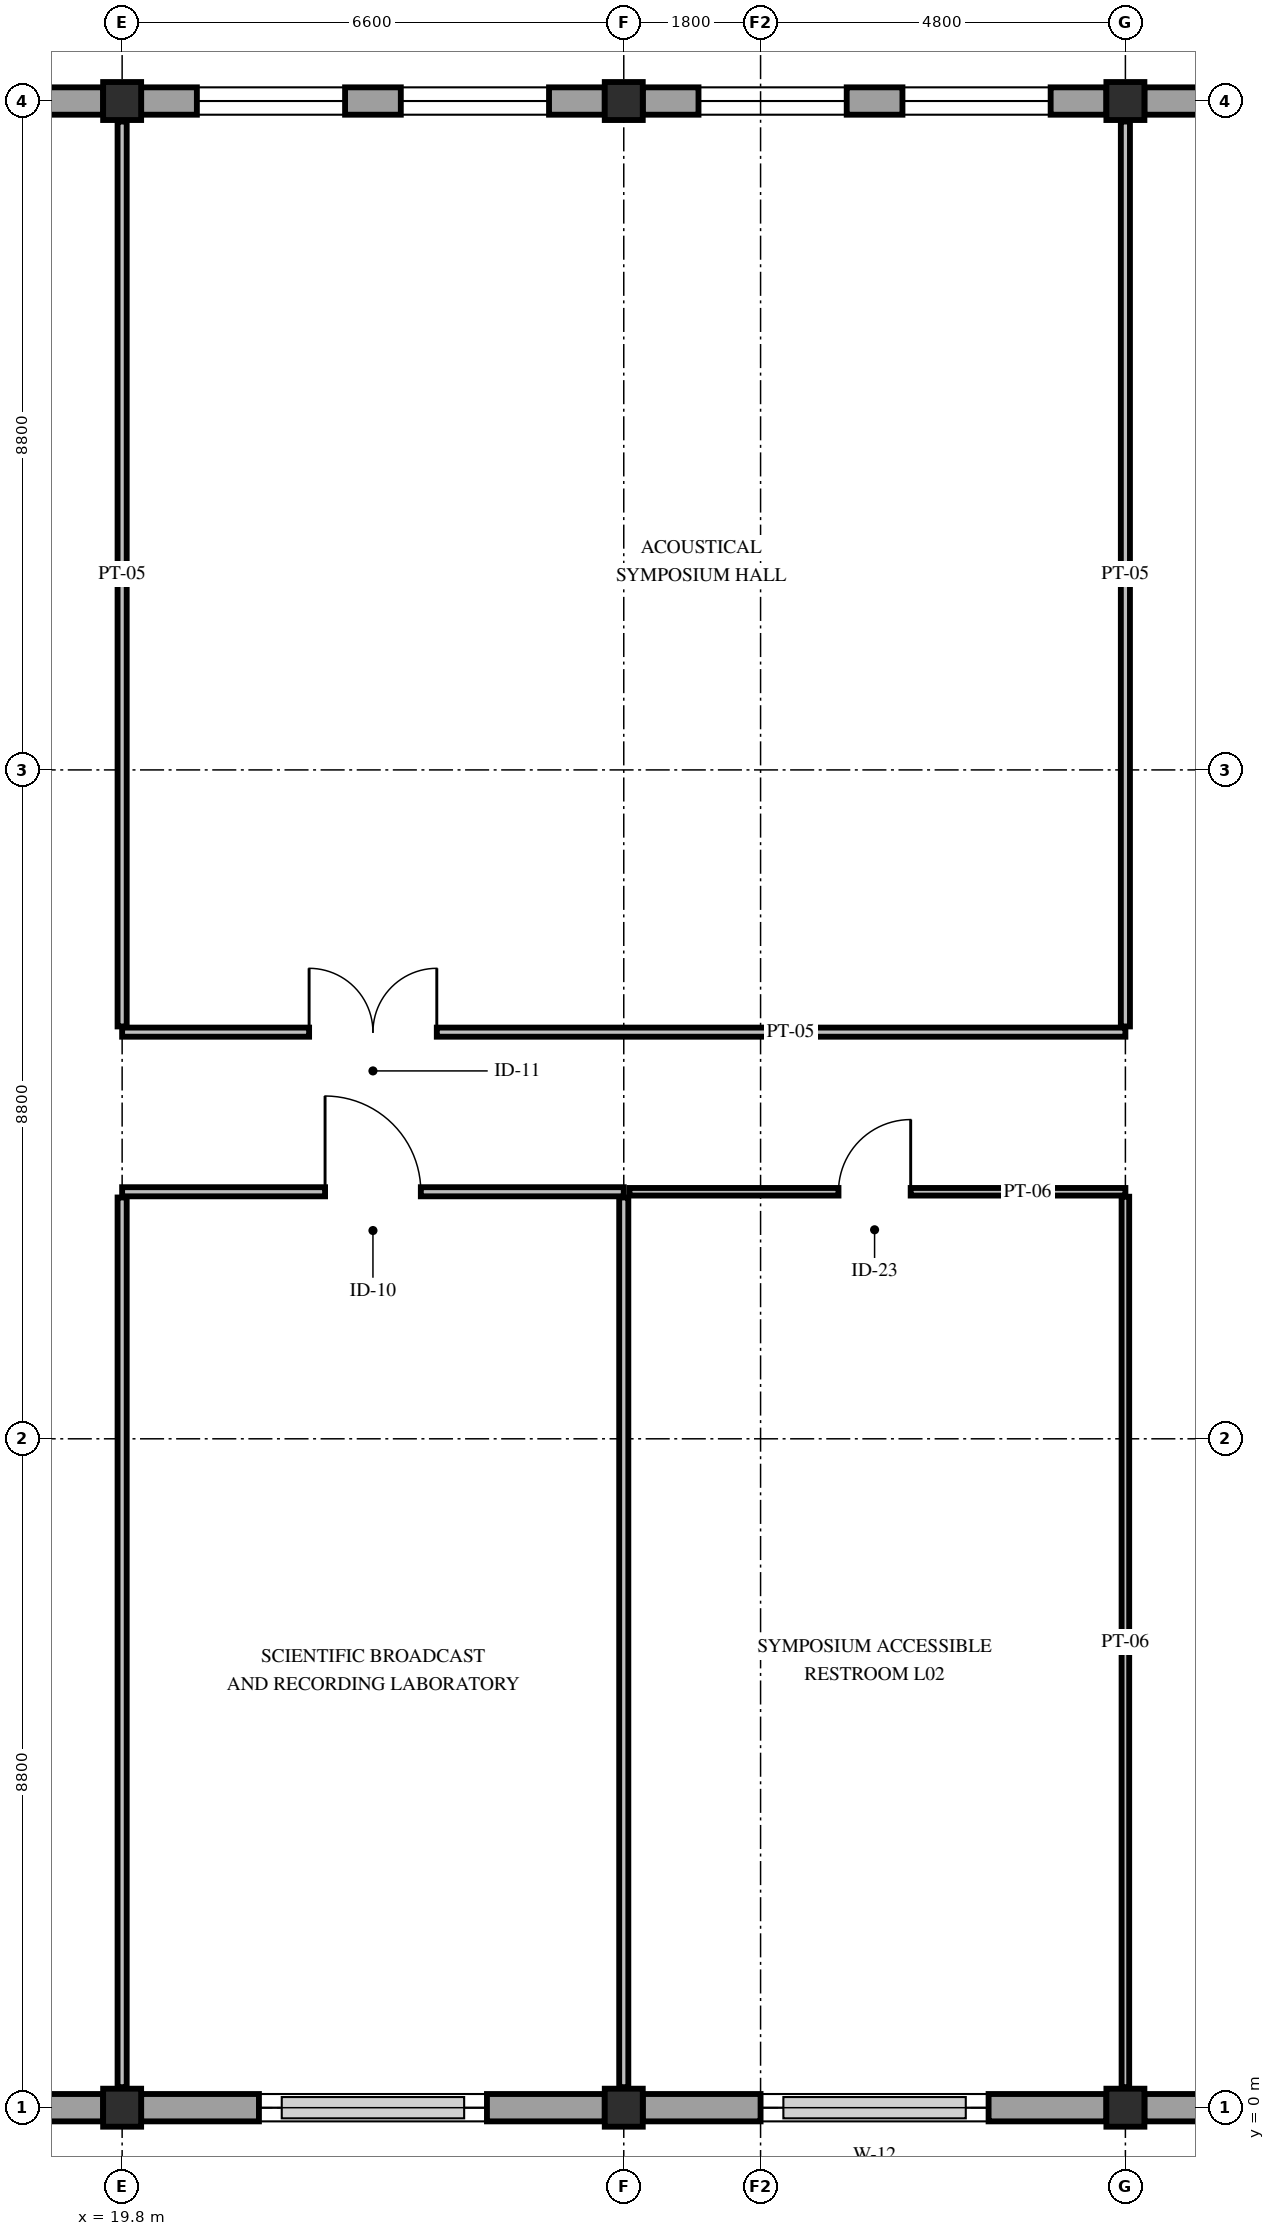
"""IFC4 building model, lengths in metres.
Left out: names, types, materials, properties, quantities, classifications, styles, units other than length and angle.
Written with IfcOpenShell. Run it as: python <this file> out.ifc"""

import sys

from ifc_helpers import new_model, si_unit, direction, frame, frame_2d, origin, origin_2d, place, context, subcontext, project, spatial, rectangle, extrude, element, fill, save


model = new_model("IFC4")
c1 = context("Model", 3, precision=1e-05, world=origin(), true_north=direction((0.0, 1.0)))
c2 = subcontext(c1, "Body", "Model", "MODEL_VIEW")
j1 = project(units=[si_unit("LENGTHUNIT", "METRE"), si_unit("PLANEANGLEUNIT", "RADIAN")], contexts=[c1])
p1 = place(None, origin())
s1 = spatial("IfcSite", under=j1, at=p1, CompositionType="ELEMENT")
p2 = place(p1, origin())
s2 = spatial("IfcBuilding", under=s1, at=p2, CompositionType="ELEMENT")
p3 = place(p2, frame((0.0, 0.0, 10.2)))
s3 = spatial("IfcBuildingStorey", under=s2, at=p3, CompositionType="ELEMENT", Elevation=10.2)
for number, where, z_axis, x_axis in (
    (1, (19.8, 0.0, 0.0), (0.0, 0.0, 1.0), (1.0, 0.0, 0.0)),
    (2, (19.8, 26.4, 0.0), (0.0, 0.0, 1.0), (1.0, 0.0, 0.0)),
    (3, (26.4, 0.0, 0.0), (0.0, 0.0, 1.0), (1.0, 0.0, 0.0)),
    (4, (26.4, 26.4, 0.0), (0.0, 0.0, 1.0), (1.0, 0.0, 0.0)),
    (5, (33.0, 0.0, 0.0), (0.0, 0.0, 1.0), (1.0, 0.0, 0.0)),
    (6, (33.0, 26.4, 0.0), (0.0, 0.0, 1.0), (1.0, 0.0, 0.0)),
):
    element("IfcColumn", number, at=place(p3, frame(where, z_axis=z_axis, x_axis=x_axis)), inside=s3, PredefinedType="COLUMN", context=c2, shape_type="SweptSolid", body=[
        extrude(rectangle(XDim=0.5, YDim=0.5, at=origin_2d()), origin(), (0.0, 0.0, 1.0), 4.8),
    ])
p4 = place(p3, frame((13.45, 26.4, 0.0), z_axis=(0.0, 0.0, 1.0), x_axis=(1.0, 0.0, 0.0)))
e7 = element("IfcWall", 7, at=p4, inside=s3, PredefinedType="STANDARD", context=c2, shape_type="SweptSolid", body=[
    extrude(rectangle(XDim=6.1, YDim=0.36, at=frame_2d((3.05, 0.0))), origin(), (0.0, 0.0, 1.0), 3.36),
])
p5 = place(p4, frame((0.733, 0.0, 0.85)))
e8 = element("IfcOpeningElement", 8, at=p5, cuts=e7, PredefinedType="OPENING", context=c2, shape_type="SweptSolid", body=[
    extrude(rectangle(XDim=1.95, YDim=1.5, at=frame_2d((0.975, 0.75))), frame((0.0, 0.195, 0.0), z_axis=(0.0, -1.0, 0.0), x_axis=(1.0, 0.0, 0.0)), (0.0, 0.0, 1.0), 0.39),
])
p6 = place(p4, frame((3.417, 0.0, 0.85)))
e9 = element("IfcOpeningElement", 9, at=p6, cuts=e7, PredefinedType="OPENING", context=c2, shape_type="SweptSolid", body=[
    extrude(rectangle(XDim=1.95, YDim=1.5, at=frame_2d((0.975, 0.75))), frame((0.0, 0.195, 0.0), z_axis=(0.0, -1.0, 0.0), x_axis=(1.0, 0.0, 0.0)), (0.0, 0.0, 1.0), 0.39),
])
p7 = place(p3, frame((20.05, 26.4, 0.0), z_axis=(0.0, 0.0, 1.0), x_axis=(1.0, 0.0, 0.0)))
e10 = element("IfcWall", 10, at=p7, inside=s3, PredefinedType="STANDARD", context=c2, shape_type="SweptSolid", body=[
    extrude(rectangle(XDim=6.1, YDim=0.36, at=frame_2d((3.05, 0.0))), origin(), (0.0, 0.0, 1.0), 3.36),
])
p8 = place(p7, frame((0.733, 0.0, 0.85)))
e11 = element("IfcOpeningElement", 11, at=p8, cuts=e10, PredefinedType="OPENING", context=c2, shape_type="SweptSolid", body=[
    extrude(rectangle(XDim=1.95, YDim=1.5, at=frame_2d((0.975, 0.75))), frame((0.0, 0.195, 0.0), z_axis=(0.0, -1.0, 0.0), x_axis=(1.0, 0.0, 0.0)), (0.0, 0.0, 1.0), 0.39),
])
p9 = place(p7, frame((3.417, 0.0, 0.85)))
e12 = element("IfcOpeningElement", 12, at=p9, cuts=e10, PredefinedType="OPENING", context=c2, shape_type="SweptSolid", body=[
    extrude(rectangle(XDim=1.95, YDim=1.5, at=frame_2d((0.975, 0.75))), frame((0.0, 0.195, 0.0), z_axis=(0.0, -1.0, 0.0), x_axis=(1.0, 0.0, 0.0)), (0.0, 0.0, 1.0), 0.39),
])
p10 = place(p3, frame((26.65, 26.4, 0.0), z_axis=(0.0, 0.0, 1.0), x_axis=(1.0, 0.0, 0.0)))
e13 = element("IfcWall", 13, at=p10, inside=s3, PredefinedType="STANDARD", context=c2, shape_type="SweptSolid", body=[
    extrude(rectangle(XDim=6.1, YDim=0.36, at=frame_2d((3.05, 0.0))), origin(), (0.0, 0.0, 1.0), 3.36),
])
p11 = place(p10, frame((0.733, 0.0, 0.85)))
e14 = element("IfcOpeningElement", 14, at=p11, cuts=e13, PredefinedType="OPENING", context=c2, shape_type="SweptSolid", body=[
    extrude(rectangle(XDim=1.95, YDim=1.5, at=frame_2d((0.975, 0.75))), frame((0.0, 0.195, 0.0), z_axis=(0.0, -1.0, 0.0), x_axis=(1.0, 0.0, 0.0)), (0.0, 0.0, 1.0), 0.39),
])
p12 = place(p10, frame((3.417, 0.0, 0.85)))
e15 = element("IfcOpeningElement", 15, at=p12, cuts=e13, PredefinedType="OPENING", context=c2, shape_type="SweptSolid", body=[
    extrude(rectangle(XDim=1.95, YDim=1.5, at=frame_2d((0.975, 0.75))), frame((0.0, 0.195, 0.0), z_axis=(0.0, -1.0, 0.0), x_axis=(1.0, 0.0, 0.0)), (0.0, 0.0, 1.0), 0.39),
])
p13 = place(p3, frame((33.25, 26.4, 0.0), z_axis=(0.0, 0.0, 1.0), x_axis=(1.0, 0.0, 0.0)))
e16 = element("IfcWall", 16, at=p13, inside=s3, PredefinedType="STANDARD", context=c2, shape_type="SweptSolid", body=[
    extrude(rectangle(XDim=6.1, YDim=0.36, at=frame_2d((3.05, 0.0))), origin(), (0.0, 0.0, 1.0), 3.36),
])
p14 = place(p13, frame((0.733, 0.0, 0.85)))
e17 = element("IfcOpeningElement", 17, at=p14, cuts=e16, PredefinedType="OPENING", context=c2, shape_type="SweptSolid", body=[
    extrude(rectangle(XDim=1.95, YDim=1.5, at=frame_2d((0.975, 0.75))), frame((0.0, 0.195, 0.0), z_axis=(0.0, -1.0, 0.0), x_axis=(1.0, 0.0, 0.0)), (0.0, 0.0, 1.0), 0.39),
])
p15 = place(p13, frame((3.417, 0.0, 0.85)))
e18 = element("IfcOpeningElement", 18, at=p15, cuts=e16, PredefinedType="OPENING", context=c2, shape_type="SweptSolid", body=[
    extrude(rectangle(XDim=1.95, YDim=1.5, at=frame_2d((0.975, 0.75))), frame((0.0, 0.195, 0.0), z_axis=(0.0, -1.0, 0.0), x_axis=(1.0, 0.0, 0.0)), (0.0, 0.0, 1.0), 0.39),
])
p16 = place(p3, frame((39.35, 0.0, 0.0), z_axis=(0.0, 0.0, 1.0), x_axis=(-1.0, 0.0, 0.0)))
e19 = element("IfcWall", 19, at=p16, inside=s3, PredefinedType="STANDARD", context=c2, shape_type="SweptSolid", body=[
    extrude(rectangle(XDim=6.1, YDim=0.36, at=frame_2d((3.05, 0.0))), origin(), (0.0, 0.0, 1.0), 3.36),
])
p17 = place(p16, frame((1.55, 0.0, 0.85)))
e20 = element("IfcOpeningElement", 20, at=p17, cuts=e19, PredefinedType="OPENING", context=c2, shape_type="SweptSolid", body=[
    extrude(rectangle(XDim=3.0, YDim=1.5, at=frame_2d((1.5, 0.75))), frame((0.0, 0.195, 0.0), z_axis=(0.0, -1.0, 0.0), x_axis=(1.0, 0.0, 0.0)), (0.0, 0.0, 1.0), 0.39),
])
p18 = place(p3, frame((32.75, 0.0, 0.0), z_axis=(0.0, 0.0, 1.0), x_axis=(-1.0, 0.0, 0.0)))
e21 = element("IfcWall", 21, at=p18, inside=s3, PredefinedType="STANDARD", context=c2, shape_type="SweptSolid", body=[
    extrude(rectangle(XDim=6.1, YDim=0.36, at=frame_2d((3.05, 0.0))), origin(), (0.0, 0.0, 1.0), 3.36),
])
p19 = place(p18, frame((1.55, 0.0, 0.85)))
e22 = element("IfcOpeningElement", 22, at=p19, cuts=e21, PredefinedType="OPENING", context=c2, shape_type="SweptSolid", body=[
    extrude(rectangle(XDim=3.0, YDim=1.5, at=frame_2d((1.5, 0.75))), frame((0.0, 0.195, 0.0), z_axis=(0.0, -1.0, 0.0), x_axis=(1.0, 0.0, 0.0)), (0.0, 0.0, 1.0), 0.39),
])
p20 = place(p3, frame((26.15, 0.0, 0.0), z_axis=(0.0, 0.0, 1.0), x_axis=(-1.0, 0.0, 0.0)))
e23 = element("IfcWall", 23, at=p20, inside=s3, PredefinedType="STANDARD", context=c2, shape_type="SweptSolid", body=[
    extrude(rectangle(XDim=6.1, YDim=0.36, at=frame_2d((3.05, 0.0))), origin(), (0.0, 0.0, 1.0), 3.36),
])
p21 = place(p20, frame((1.55, 0.0, 0.85)))
e24 = element("IfcOpeningElement", 24, at=p21, cuts=e23, PredefinedType="OPENING", context=c2, shape_type="SweptSolid", body=[
    extrude(rectangle(XDim=3.0, YDim=1.5, at=frame_2d((1.5, 0.75))), frame((0.0, 0.195, 0.0), z_axis=(0.0, -1.0, 0.0), x_axis=(1.0, 0.0, 0.0)), (0.0, 0.0, 1.0), 0.39),
])
p22 = place(p3, frame((19.55, 0.0, 0.0), z_axis=(0.0, 0.0, 1.0), x_axis=(-1.0, 0.0, 0.0)))
e25 = element("IfcWall", 25, at=p22, inside=s3, PredefinedType="STANDARD", context=c2, shape_type="SweptSolid", body=[
    extrude(rectangle(XDim=6.1, YDim=0.36, at=frame_2d((3.05, 0.0))), origin(), (0.0, 0.0, 1.0), 3.36),
])
p23 = place(p22, frame((1.55, 0.0, 0.85)))
e26 = element("IfcOpeningElement", 26, at=p23, cuts=e25, PredefinedType="OPENING", context=c2, shape_type="SweptSolid", body=[
    extrude(rectangle(XDim=3.0, YDim=1.5, at=frame_2d((1.5, 0.75))), frame((0.0, 0.195, 0.0), z_axis=(0.0, -1.0, 0.0), x_axis=(1.0, 0.0, 0.0)), (0.0, 0.0, 1.0), 0.39),
])
p24 = place(p3, frame((19.8, 14.15, 0.0), z_axis=(0.0, 0.0, 1.0), x_axis=(1.0, 0.0, 0.0)))
e27 = element("IfcWall", 27, at=p24, inside=s3, PredefinedType="PARTITIONING", context=c2, shape_type="SweptSolid", body=[
    extrude(rectangle(XDim=13.2, YDim=0.12, at=frame_2d((6.6, 0.0))), origin(), (0.0, 0.0, 1.0), 3.36),
])
p25 = place(p24, frame((2.46, 0.0, 0.0)))
e28 = element("IfcOpeningElement", 28, at=p25, cuts=e27, PredefinedType="OPENING", context=c2, shape_type="SweptSolid", body=[
    extrude(rectangle(XDim=1.68, YDim=2.3, at=frame_2d((0.84, 1.15))), frame((0.0, 0.075, 0.0), z_axis=(0.0, -1.0, 0.0), x_axis=(1.0, 0.0, 0.0)), (0.0, 0.0, 1.0), 0.15),
])
for number, where, z_axis, x_axis in (
    (29, (19.8, 14.225, 0.0), (0.0, 0.0, 1.0), (0.0, 1.0, 0.0)),
    (30, (33.0, 14.225, 0.0), (0.0, 0.0, 1.0), (0.0, 1.0, 0.0)),
):
    element("IfcWall", number, at=place(p3, frame(where, z_axis=z_axis, x_axis=x_axis)), inside=s3, PredefinedType="PARTITIONING", context=c2, shape_type="SweptSolid", body=[
        extrude(rectangle(XDim=11.905, YDim=0.12, at=frame_2d((5.952, 0.0))), origin(), (0.0, 0.0, 1.0), 3.36),
    ])
p26 = place(p3, frame((19.8, 12.05, 0.0), z_axis=(0.0, 0.0, 1.0), x_axis=(1.0, 0.0, 0.0)))
e31 = element("IfcWall", 31, at=p26, inside=s3, PredefinedType="PARTITIONING", context=c2, shape_type="SweptSolid", body=[
    extrude(rectangle(XDim=6.6, YDim=0.12, at=frame_2d((3.3, 0.0))), origin(), (0.0, 0.0, 1.0), 3.36),
])
p27 = place(p26, frame((2.67, 0.0, 0.0)))
e32 = element("IfcOpeningElement", 32, at=p27, cuts=e31, PredefinedType="OPENING", context=c2, shape_type="SweptSolid", body=[
    extrude(rectangle(XDim=1.26, YDim=2.2, at=frame_2d((0.63, 1.1))), frame((0.0, 0.075, 0.0), z_axis=(0.0, -1.0, 0.0), x_axis=(1.0, 0.0, 0.0)), (0.0, 0.0, 1.0), 0.15),
])
for number, where, z_axis, x_axis in (
    (33, (19.8, 0.27, 0.0), (0.0, 0.0, 1.0), (0.0, 1.0, 0.0)),
    (34, (26.4, 0.27, 0.0), (0.0, 0.0, 1.0), (0.0, 1.0, 0.0)),
):
    element("IfcWall", number, at=place(p3, frame(where, z_axis=z_axis, x_axis=x_axis)), inside=s3, PredefinedType="PARTITIONING", context=c2, shape_type="SweptSolid", body=[
        extrude(rectangle(XDim=11.705, YDim=0.12, at=frame_2d((5.853, 0.0))), origin(), (0.0, 0.0, 1.0), 3.36),
    ])
p28 = place(p3, frame((26.475, 12.05, 0.0), z_axis=(0.0, 0.0, 1.0), x_axis=(1.0, 0.0, 0.0)))
e35 = element("IfcWall", 35, at=p28, inside=s3, PredefinedType="PARTITIONING", context=c2, shape_type="SweptSolid", body=[
    extrude(rectangle(XDim=6.525, YDim=0.1, at=frame_2d((3.262, 0.0))), origin(), (0.0, 0.0, 1.0), 3.36),
])
p29 = place(p28, frame((2.75, 0.0, 0.0)))
e36 = element("IfcOpeningElement", 36, at=p29, cuts=e35, PredefinedType="OPENING", context=c2, shape_type="SweptSolid", body=[
    extrude(rectangle(XDim=0.95, YDim=2.15, at=frame_2d((0.475, 1.075))), frame((0.0, 0.065, 0.0), z_axis=(0.0, -1.0, 0.0), x_axis=(1.0, 0.0, 0.0)), (0.0, 0.0, 1.0), 0.13),
])
p30 = place(p3, frame((33.0, 0.27, 0.0), z_axis=(0.0, 0.0, 1.0), x_axis=(0.0, 1.0, 0.0)))
e37 = element("IfcWall", 37, at=p30, inside=s3, PredefinedType="PARTITIONING", context=c2, shape_type="SweptSolid", body=[
    extrude(rectangle(XDim=11.715, YDim=0.1, at=frame_2d((5.857, 0.0))), origin(), (0.0, 0.0, 1.0), 3.36),
])
p31 = place(p8, origin())
e38 = element("IfcWindow", 38, at=p31, inside=s3, PartitioningType="DOUBLE_PANEL_VERTICAL", PredefinedType="WINDOW", context=c2, shape_type="SweptSolid", body=[
    extrude(rectangle(XDim=1.95, YDim=1.5, at=frame_2d((0.975, 0.75))), frame((0.0, 0.03, 0.0), z_axis=(0.0, -1.0, 0.0), x_axis=(1.0, 0.0, 0.0)), (0.0, 0.0, 1.0), 0.06),
])
fill(e11, e38)
p32 = place(p9, origin())
e39 = element("IfcWindow", 39, at=p32, inside=s3, PartitioningType="DOUBLE_PANEL_VERTICAL", PredefinedType="WINDOW", context=c2, shape_type="SweptSolid", body=[
    extrude(rectangle(XDim=1.95, YDim=1.5, at=frame_2d((0.975, 0.75))), frame((0.0, 0.03, 0.0), z_axis=(0.0, -1.0, 0.0), x_axis=(1.0, 0.0, 0.0)), (0.0, 0.0, 1.0), 0.06),
])
fill(e12, e39)
p33 = place(p11, origin())
e40 = element("IfcWindow", 40, at=p33, inside=s3, PartitioningType="DOUBLE_PANEL_VERTICAL", PredefinedType="WINDOW", context=c2, shape_type="SweptSolid", body=[
    extrude(rectangle(XDim=1.95, YDim=1.5, at=frame_2d((0.975, 0.75))), frame((0.0, 0.03, 0.0), z_axis=(0.0, -1.0, 0.0), x_axis=(1.0, 0.0, 0.0)), (0.0, 0.0, 1.0), 0.06),
])
fill(e14, e40)
p34 = place(p12, origin())
e41 = element("IfcWindow", 41, at=p34, inside=s3, PartitioningType="DOUBLE_PANEL_VERTICAL", PredefinedType="WINDOW", context=c2, shape_type="SweptSolid", body=[
    extrude(rectangle(XDim=1.95, YDim=1.5, at=frame_2d((0.975, 0.75))), frame((0.0, 0.03, 0.0), z_axis=(0.0, -1.0, 0.0), x_axis=(1.0, 0.0, 0.0)), (0.0, 0.0, 1.0), 0.06),
])
fill(e15, e41)
p35 = place(p19, origin())
e42 = element("IfcWindow", 42, at=p35, inside=s3, PartitioningType="DOUBLE_PANEL_VERTICAL", PredefinedType="WINDOW", context=c2, shape_type="SweptSolid", body=[
    extrude(rectangle(XDim=3.0, YDim=1.5, at=frame_2d((1.5, 0.75))), frame((0.0, 0.03, 0.0), z_axis=(0.0, -1.0, 0.0), x_axis=(1.0, 0.0, 0.0)), (0.0, 0.0, 1.0), 0.06),
])
fill(e22, e42)
p36 = place(p21, origin())
e43 = element("IfcWindow", 43, at=p36, inside=s3, PartitioningType="DOUBLE_PANEL_VERTICAL", PredefinedType="WINDOW", context=c2, shape_type="SweptSolid", body=[
    extrude(rectangle(XDim=3.0, YDim=1.5, at=frame_2d((1.5, 0.75))), frame((0.0, 0.03, 0.0), z_axis=(0.0, -1.0, 0.0), x_axis=(1.0, 0.0, 0.0)), (0.0, 0.0, 1.0), 0.06),
])
fill(e24, e43)
p37 = place(p25, origin())
e44 = element("IfcDoor", 44, at=p37, inside=s3, OperationType="DOUBLE_DOOR_SINGLE_SWING", PredefinedType="DOOR", context=c2, shape_type="SweptSolid", body=[
    extrude(rectangle(XDim=1.68, YDim=2.3, at=frame_2d((0.84, 1.15))), frame((0.0, 0.025, 0.0), z_axis=(0.0, -1.0, 0.0), x_axis=(1.0, 0.0, 0.0)), (0.0, 0.0, 1.0), 0.05),
])
fill(e28, e44)
p38 = place(p27, origin())
e45 = element("IfcDoor", 45, at=p38, inside=s3, OperationType="SINGLE_SWING_LEFT", PredefinedType="DOOR", context=c2, shape_type="SweptSolid", body=[
    extrude(rectangle(XDim=1.26, YDim=2.2, at=frame_2d((0.63, 1.1))), frame((0.0, 0.025, 0.0), z_axis=(0.0, -1.0, 0.0), x_axis=(1.0, 0.0, 0.0)), (0.0, 0.0, 1.0), 0.05),
])
fill(e32, e45)
p39 = place(p29, origin())
e46 = element("IfcDoor", 46, at=p39, inside=s3, OperationType="SINGLE_SWING_RIGHT", PredefinedType="DOOR", context=c2, shape_type="SweptSolid", body=[
    extrude(rectangle(XDim=0.95, YDim=2.15, at=frame_2d((0.475, 1.075))), frame((0.0, 0.025, 0.0), z_axis=(0.0, -1.0, 0.0), x_axis=(1.0, 0.0, 0.0)), (0.0, 0.0, 1.0), 0.05),
])
fill(e36, e46)
save(model, sys.argv[1])
